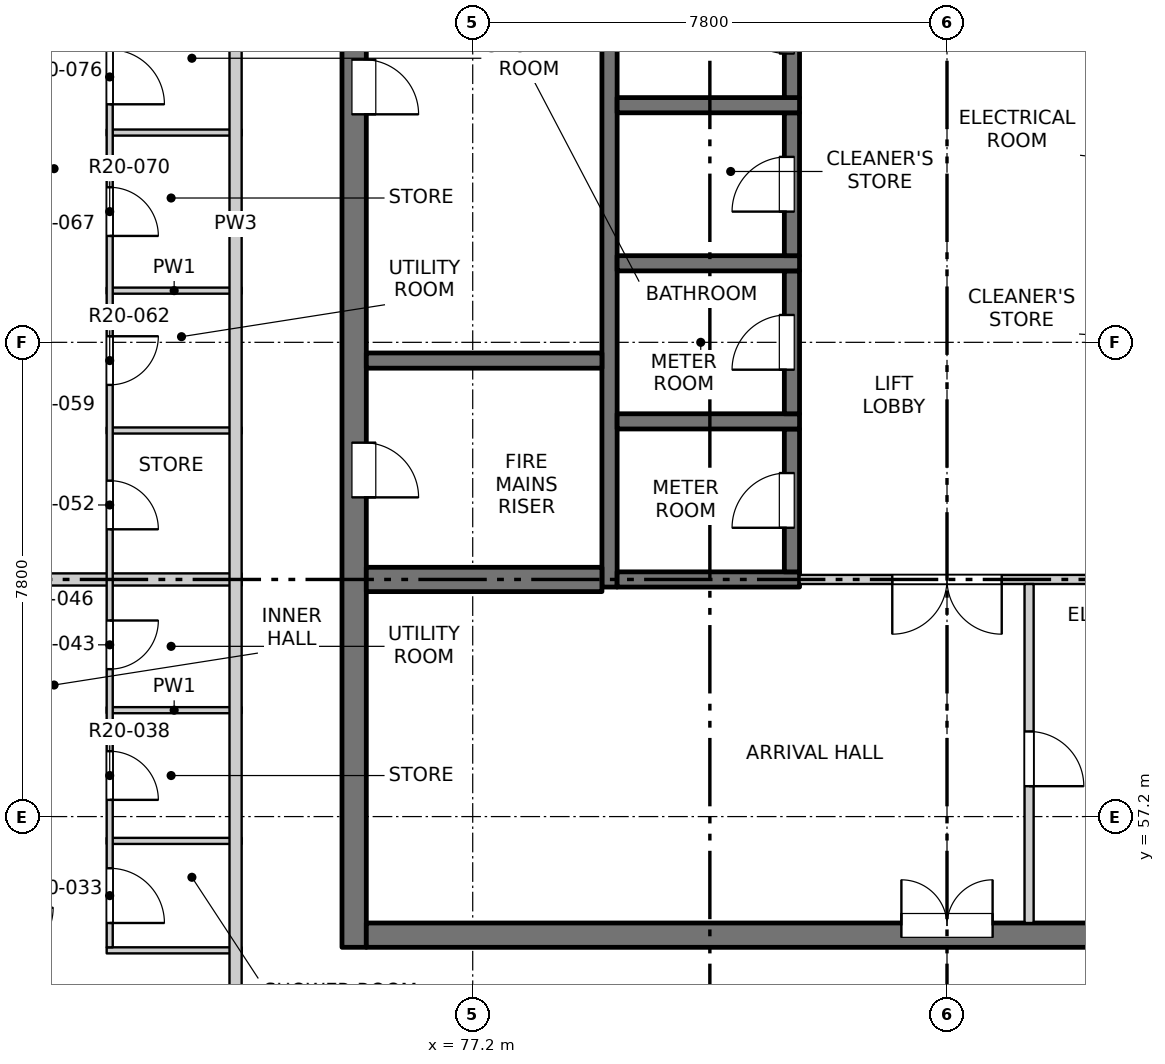
"""IFC4 building model, lengths in metres.
Left out: names, types, materials, properties, quantities, classifications, styles, units other than length and angle.
Written with IfcOpenShell. Run it as: python <this file> out.ifc"""

import sys

from ifc_helpers import new_model, si_unit, direction, frame, frame_2d, origin, place, context, subcontext, project, spatial, rectangle, extrude, element, fill, save


model = new_model("IFC4")
c1 = context("Model", 3, precision=1e-05, world=origin(), true_north=direction((0.0, 1.0)))
c2 = subcontext(c1, "Body", "Model", "MODEL_VIEW")
j1 = project(units=[si_unit("LENGTHUNIT", "METRE"), si_unit("PLANEANGLEUNIT", "RADIAN")], contexts=[c1])
p1 = place(None, origin())
s1 = spatial("IfcSite", under=j1, at=p1, CompositionType="ELEMENT")
p2 = place(p1, origin())
s2 = spatial("IfcBuilding", under=s1, at=p2, CompositionType="ELEMENT")
p3 = place(p2, frame((0.0, 0.0, 210.9)))
s3 = spatial("IfcBuildingStorey", under=s2, at=p3, CompositionType="ELEMENT", Elevation=210.9)
p4 = place(p3, frame((75.25, 55.05, -0.25), z_axis=(0.0, 0.0, 1.0), x_axis=(0.0, 1.0, 0.0)))
e1 = element("IfcWall", 1, at=p4, inside=s3, PredefinedType="SOLIDWALL", context=c2, shape_type="SweptSolid", body=[
    extrude(rectangle(XDim=22.25, YDim=0.4, at=frame_2d((11.125, 0.0))), origin(), (0.0, 0.0, 1.0), 3.4),
])
p5 = place(p4, frame((7.4, 0.0, 0.25)))
e2 = element("IfcOpeningElement", 2, at=p5, cuts=e1, PredefinedType="OPENING", context=c2, shape_type="SweptSolid", body=[
    extrude(rectangle(XDim=0.9, YDim=2.1, at=frame_2d((0.45, 1.05))), frame((0.0, 0.21, 0.0), z_axis=(0.0, -1.0, 0.0), x_axis=(1.0, 0.0, 0.0)), (0.0, 0.0, 1.0), 0.42),
])
p6 = place(p4, frame((13.7, 0.0, 0.25)))
e3 = element("IfcOpeningElement", 3, at=p6, cuts=e1, PredefinedType="OPENING", context=c2, shape_type="SweptSolid", body=[
    extrude(rectangle(XDim=0.9, YDim=2.1, at=frame_2d((0.45, 1.05))), frame((0.0, 0.21, 0.0), z_axis=(0.0, -1.0, 0.0), x_axis=(1.0, 0.0, 0.0)), (0.0, 0.0, 1.0), 0.42),
])
p7 = place(p4, frame((20.0, 0.0, 0.25)))
e4 = element("IfcOpeningElement", 4, at=p7, cuts=e1, PredefinedType="OPENING", context=c2, shape_type="SweptSolid", body=[
    extrude(rectangle(XDim=0.9, YDim=2.1, at=frame_2d((0.45, 1.05))), frame((0.0, 0.21, 0.0), z_axis=(0.0, -1.0, 0.0), x_axis=(1.0, 0.0, 0.0)), (0.0, 0.0, 1.0), 0.42),
])
p8 = place(p3, frame((75.45, 55.25, -0.25), z_axis=(0.0, 0.0, 1.0), x_axis=(1.0, 0.0, 0.0)))
e5 = element("IfcWall", 5, at=p8, inside=s3, PredefinedType="SOLIDWALL", context=c2, shape_type="SweptSolid", body=[
    extrude(rectangle(XDim=19.1, YDim=0.4, at=frame_2d((9.55, 0.0))), origin(), (0.0, 0.0, 1.0), 3.4),
])
p9 = place(p8, frame((8.8, 0.0, 0.25)))
e6 = element("IfcOpeningElement", 6, at=p9, cuts=e5, PredefinedType="OPENING", context=c2, shape_type="SweptSolid", body=[
    extrude(rectangle(XDim=1.5, YDim=2.1, at=frame_2d((0.75, 1.05))), frame((0.0, 0.21, 0.0), z_axis=(0.0, -1.0, 0.0), x_axis=(1.0, 0.0, 0.0)), (0.0, 0.0, 1.0), 0.42),
])
p10 = place(p3, frame((79.45, 60.975, -0.25), z_axis=(0.0, 0.0, 1.0), x_axis=(0.0, 1.0, 0.0)))
e7 = element("IfcWall", 7, at=p10, inside=s3, PredefinedType="SOLIDWALL", context=c2, shape_type="SweptSolid", body=[
    extrude(rectangle(XDim=16.325, YDim=0.25, at=frame_2d((8.163, 0.0))), origin(), (0.0, 0.0, 1.0), 3.4),
])
p11 = place(p3, frame((79.575, 61.1, -0.25), z_axis=(0.0, 0.0, 1.0), x_axis=(1.0, 0.0, 0.0)))
e8 = element("IfcWall", 8, at=p11, inside=s3, PredefinedType="SOLIDWALL", context=c2, shape_type="SweptSolid", body=[
    extrude(rectangle(XDim=3.0, YDim=0.25, at=frame_2d((1.5, 0.0))), origin(), (0.0, 0.0, 1.0), 3.4),
])
p12 = place(p3, frame((82.45, 61.225, -0.25), z_axis=(0.0, 0.0, 1.0), x_axis=(0.0, 1.0, 0.0)))
e9 = element("IfcWall", 9, at=p12, inside=s3, PredefinedType="SOLIDWALL", context=c2, shape_type="SweptSolid", body=[
    extrude(rectangle(XDim=2.35, YDim=0.25, at=frame_2d((1.175, 0.0))), origin(), (0.0, 0.0, 1.0), 3.4),
])
p13 = place(p12, frame((0.725, 0.0, 0.25)))
e10 = element("IfcOpeningElement", 10, at=p13, cuts=e9, PredefinedType="OPENING", context=c2, shape_type="SweptSolid", body=[
    extrude(rectangle(XDim=0.9, YDim=2.1, at=frame_2d((0.45, 1.05))), frame((0.0, 0.135, 0.0), z_axis=(0.0, -1.0, 0.0), x_axis=(1.0, 0.0, 0.0)), (0.0, 0.0, 1.0), 0.27),
])
p14 = place(p3, frame((79.575, 63.7, -0.25), z_axis=(0.0, 0.0, 1.0), x_axis=(1.0, 0.0, 0.0)))
e11 = element("IfcWall", 11, at=p14, inside=s3, PredefinedType="SOLIDWALL", context=c2, shape_type="SweptSolid", body=[
    extrude(rectangle(XDim=3.0, YDim=0.25, at=frame_2d((1.5, 0.0))), origin(), (0.0, 0.0, 1.0), 3.4),
])
p15 = place(p3, frame((82.45, 63.825, -0.25), z_axis=(0.0, 0.0, 1.0), x_axis=(0.0, 1.0, 0.0)))
e12 = element("IfcWall", 12, at=p15, inside=s3, PredefinedType="SOLIDWALL", context=c2, shape_type="SweptSolid", body=[
    extrude(rectangle(XDim=2.35, YDim=0.25, at=frame_2d((1.175, 0.0))), origin(), (0.0, 0.0, 1.0), 3.4),
])
p16 = place(p15, frame((0.725, 0.0, 0.25)))
e13 = element("IfcOpeningElement", 13, at=p16, cuts=e12, PredefinedType="OPENING", context=c2, shape_type="SweptSolid", body=[
    extrude(rectangle(XDim=0.9, YDim=2.1, at=frame_2d((0.45, 1.05))), frame((0.0, 0.135, 0.0), z_axis=(0.0, -1.0, 0.0), x_axis=(1.0, 0.0, 0.0)), (0.0, 0.0, 1.0), 0.27),
])
p17 = place(p3, frame((79.575, 66.3, -0.25), z_axis=(0.0, 0.0, 1.0), x_axis=(1.0, 0.0, 0.0)))
e14 = element("IfcWall", 14, at=p17, inside=s3, PredefinedType="SOLIDWALL", context=c2, shape_type="SweptSolid", body=[
    extrude(rectangle(XDim=3.0, YDim=0.25, at=frame_2d((1.5, 0.0))), origin(), (0.0, 0.0, 1.0), 3.4),
])
p18 = place(p3, frame((82.45, 66.425, -0.25), z_axis=(0.0, 0.0, 1.0), x_axis=(0.0, 1.0, 0.0)))
e15 = element("IfcWall", 15, at=p18, inside=s3, PredefinedType="SOLIDWALL", context=c2, shape_type="SweptSolid", body=[
    extrude(rectangle(XDim=2.35, YDim=0.25, at=frame_2d((1.175, 0.0))), origin(), (0.0, 0.0, 1.0), 3.4),
])
p19 = place(p18, frame((0.725, 0.0, 0.25)))
e16 = element("IfcOpeningElement", 16, at=p19, cuts=e15, PredefinedType="OPENING", context=c2, shape_type="SweptSolid", body=[
    extrude(rectangle(XDim=0.9, YDim=2.1, at=frame_2d((0.45, 1.05))), frame((0.0, 0.135, 0.0), z_axis=(0.0, -1.0, 0.0), x_axis=(1.0, 0.0, 0.0)), (0.0, 0.0, 1.0), 0.27),
])
p20 = place(p3, frame((79.575, 68.9, -0.25), z_axis=(0.0, 0.0, 1.0), x_axis=(1.0, 0.0, 0.0)))
e17 = element("IfcWall", 17, at=p20, inside=s3, PredefinedType="SOLIDWALL", context=c2, shape_type="SweptSolid", body=[
    extrude(rectangle(XDim=3.0, YDim=0.25, at=frame_2d((1.5, 0.0))), origin(), (0.0, 0.0, 1.0), 3.4),
])
p21 = place(p3, frame((82.45, 69.025, -0.25), z_axis=(0.0, 0.0, 1.0), x_axis=(0.0, 1.0, 0.0)))
e18 = element("IfcWall", 18, at=p21, inside=s3, PredefinedType="SOLIDWALL", context=c2, shape_type="SweptSolid", body=[
    extrude(rectangle(XDim=2.35, YDim=0.25, at=frame_2d((1.175, 0.0))), origin(), (0.0, 0.0, 1.0), 3.4),
])
p22 = place(p21, frame((0.725, 0.0, 0.25)))
e19 = element("IfcOpeningElement", 19, at=p22, cuts=e18, PredefinedType="OPENING", context=c2, shape_type="SweptSolid", body=[
    extrude(rectangle(XDim=0.9, YDim=2.1, at=frame_2d((0.45, 1.05))), frame((0.0, 0.135, 0.0), z_axis=(0.0, -1.0, 0.0), x_axis=(1.0, 0.0, 0.0)), (0.0, 0.0, 1.0), 0.27),
])
p23 = place(p3, frame((75.45, 61.1, -0.25), z_axis=(0.0, 0.0, 1.0), x_axis=(1.0, 0.0, 0.0)))
e20 = element("IfcWall", 20, at=p23, inside=s3, PredefinedType="SOLIDWALL", context=c2, shape_type="SweptSolid", body=[
    extrude(rectangle(XDim=3.875, YDim=0.4, at=frame_2d((1.938, 0.0))), origin(), (0.0, 0.0, 1.0), 3.4),
])
p24 = place(p3, frame((75.45, 64.7, -0.25), z_axis=(0.0, 0.0, 1.0), x_axis=(1.0, 0.0, 0.0)))
e21 = element("IfcWall", 21, at=p24, inside=s3, PredefinedType="SOLIDWALL", context=c2, shape_type="SweptSolid", body=[
    extrude(rectangle(XDim=3.875, YDim=0.25, at=frame_2d((1.938, 0.0))), origin(), (0.0, 0.0, 1.0), 3.4),
])
for number, where, z_axis, x_axis in (
    (22, (71.18, 55.0, 0.0), (0.0, 0.0, 1.0), (1.0, 0.0, 0.0)),
    (23, (71.18, 56.8, 0.0), (0.0, 0.0, 1.0), (1.0, 0.0, 0.0)),
    (24, (71.18, 58.95, 0.0), (0.0, 0.0, 1.0), (1.0, 0.0, 0.0)),
):
    element("IfcWall", number, at=place(p3, frame(where, z_axis=z_axis, x_axis=x_axis)), inside=s3, PredefinedType="PARTITIONING", context=c2, shape_type="SweptSolid", body=[
        extrude(rectangle(XDim=2.22, YDim=0.1, at=frame_2d((1.11, 0.0))), origin(), (0.0, 0.0, 1.0), 3.15),
    ])
p25 = place(p3, frame((61.9, 61.1, 0.0), z_axis=(0.0, 0.0, 1.0), x_axis=(1.0, 0.0, 0.0)))
e25 = element("IfcWall", 25, at=p25, inside=s3, PredefinedType="PARTITIONING", context=c2, shape_type="SweptSolid", body=[
    extrude(rectangle(XDim=11.5, YDim=0.2, at=frame_2d((5.75, 0.0))), origin(), (0.0, 0.0, 1.0), 2.55),
])
p26 = place(p3, frame((82.575, 61.1, 0.0), z_axis=(0.0, 0.0, 1.0), x_axis=(1.0, 0.0, 0.0)))
e26 = element("IfcWall", 26, at=p26, inside=s3, PredefinedType="PARTITIONING", context=c2, shape_type="SweptSolid", body=[
    extrude(rectangle(XDim=4.85, YDim=0.15, at=frame_2d((2.425, 0.0))), origin(), (0.0, 0.0, 1.0), 3.15),
])
p27 = place(p26, frame((1.525, 0.0, 0.0)))
e27 = element("IfcOpeningElement", 27, at=p27, cuts=e26, PredefinedType="OPENING", context=c2, shape_type="SweptSolid", body=[
    extrude(rectangle(XDim=1.8, YDim=2.1, at=frame_2d((0.9, 1.05))), frame((0.0, 0.085, 0.0), z_axis=(0.0, -1.0, 0.0), x_axis=(1.0, 0.0, 0.0)), (0.0, 0.0, 1.0), 0.17),
])
for number, where, z_axis, x_axis in (
    (28, (71.18, 63.55, 0.0), (0.0, 0.0, 1.0), (1.0, 0.0, 0.0)),
    (29, (71.18, 65.85, 0.0), (0.0, 0.0, 1.0), (1.0, 0.0, 0.0)),
    (30, (71.18, 68.45, 0.0), (0.0, 0.0, 1.0), (1.0, 0.0, 0.0)),
):
    element("IfcWall", number, at=place(p3, frame(where, z_axis=z_axis, x_axis=x_axis)), inside=s3, PredefinedType="PARTITIONING", context=c2, shape_type="SweptSolid", body=[
        extrude(rectangle(XDim=2.22, YDim=0.1, at=frame_2d((1.11, 0.0))), origin(), (0.0, 0.0, 1.0), 3.15),
    ])
p28 = place(p3, frame((71.23, 55.05, 0.0), z_axis=(0.0, 0.0, 1.0), x_axis=(0.0, 1.0, 0.0)))
e31 = element("IfcWall", 31, at=p28, inside=s3, PredefinedType="PARTITIONING", context=c2, shape_type="SweptSolid", body=[
    extrude(rectangle(XDim=18.25, YDim=0.1, at=frame_2d((9.125, 0.0))), origin(), (0.0, 0.0, 1.0), 3.15),
])
p29 = place(p28, frame((0.4, 0.0, 0.0)))
e32 = element("IfcOpeningElement", 32, at=p29, cuts=e31, PredefinedType="OPENING", context=c2, shape_type="SweptSolid", body=[
    extrude(rectangle(XDim=0.9, YDim=2.1, at=frame_2d((0.45, 1.05))), frame((0.0, 0.06, 0.0), z_axis=(0.0, -1.0, 0.0), x_axis=(1.0, 0.0, 0.0)), (0.0, 0.0, 1.0), 0.12),
])
p30 = place(p28, frame((2.425, 0.0, 0.0)))
e33 = element("IfcOpeningElement", 33, at=p30, cuts=e31, PredefinedType="OPENING", context=c2, shape_type="SweptSolid", body=[
    extrude(rectangle(XDim=0.8, YDim=2.1, at=frame_2d((0.4, 1.05))), frame((0.0, 0.06, 0.0), z_axis=(0.0, -1.0, 0.0), x_axis=(1.0, 0.0, 0.0)), (0.0, 0.0, 1.0), 0.12),
])
p31 = place(p28, frame((4.575, 0.0, 0.0)))
e34 = element("IfcOpeningElement", 34, at=p31, cuts=e31, PredefinedType="OPENING", context=c2, shape_type="SweptSolid", body=[
    extrude(rectangle(XDim=0.8, YDim=2.1, at=frame_2d((0.4, 1.05))), frame((0.0, 0.06, 0.0), z_axis=(0.0, -1.0, 0.0), x_axis=(1.0, 0.0, 0.0)), (0.0, 0.0, 1.0), 0.12),
])
p32 = place(p28, frame((6.875, 0.0, 0.0)))
e35 = element("IfcOpeningElement", 35, at=p32, cuts=e31, PredefinedType="OPENING", context=c2, shape_type="SweptSolid", body=[
    extrude(rectangle(XDim=0.8, YDim=2.1, at=frame_2d((0.4, 1.05))), frame((0.0, 0.06, 0.0), z_axis=(0.0, -1.0, 0.0), x_axis=(1.0, 0.0, 0.0)), (0.0, 0.0, 1.0), 0.12),
])
p33 = place(p28, frame((9.25, 0.0, 0.0)))
e36 = element("IfcOpeningElement", 36, at=p33, cuts=e31, PredefinedType="OPENING", context=c2, shape_type="SweptSolid", body=[
    extrude(rectangle(XDim=0.8, YDim=2.1, at=frame_2d((0.4, 1.05))), frame((0.0, 0.06, 0.0), z_axis=(0.0, -1.0, 0.0), x_axis=(1.0, 0.0, 0.0)), (0.0, 0.0, 1.0), 0.12),
])
p34 = place(p28, frame((11.7, 0.0, 0.0)))
e37 = element("IfcOpeningElement", 37, at=p34, cuts=e31, PredefinedType="OPENING", context=c2, shape_type="SweptSolid", body=[
    extrude(rectangle(XDim=0.8, YDim=2.1, at=frame_2d((0.4, 1.05))), frame((0.0, 0.06, 0.0), z_axis=(0.0, -1.0, 0.0), x_axis=(1.0, 0.0, 0.0)), (0.0, 0.0, 1.0), 0.12),
])
p35 = place(p28, frame((13.865, 0.0, 0.0)))
e38 = element("IfcOpeningElement", 38, at=p35, cuts=e31, PredefinedType="OPENING", context=c2, shape_type="SweptSolid", body=[
    extrude(rectangle(XDim=0.9, YDim=2.1, at=frame_2d((0.45, 1.05))), frame((0.0, 0.06, 0.0), z_axis=(0.0, -1.0, 0.0), x_axis=(1.0, 0.0, 0.0)), (0.0, 0.0, 1.0), 0.12),
])
p36 = place(p28, frame((16.315, 0.0, 0.0)))
e39 = element("IfcOpeningElement", 39, at=p36, cuts=e31, PredefinedType="OPENING", context=c2, shape_type="SweptSolid", body=[
    extrude(rectangle(XDim=0.9, YDim=2.1, at=frame_2d((0.45, 1.05))), frame((0.0, 0.06, 0.0), z_axis=(0.0, -1.0, 0.0), x_axis=(1.0, 0.0, 0.0)), (0.0, 0.0, 1.0), 0.12),
])
p37 = place(p3, frame((73.3, 49.5, 0.0), z_axis=(0.0, 0.0, 1.0), x_axis=(0.0, 1.0, 0.0)))
e40 = element("IfcWall", 40, at=p37, inside=s3, PredefinedType="PARTITIONING", context=c2, shape_type="SweptSolid", body=[
    extrude(rectangle(XDim=34.9, YDim=0.2, at=frame_2d((17.45, 0.0))), origin(), (0.0, 0.0, 1.0), 3.15),
])
p38 = place(p37, frame((3.225, 0.0, 0.0)))
e41 = element("IfcOpeningElement", 41, at=p38, cuts=e40, PredefinedType="OPENING", context=c2, shape_type="SweptSolid", body=[
    extrude(rectangle(XDim=1.0, YDim=2.1, at=frame_2d((0.5, 1.05))), frame((0.0, 0.11, 0.0), z_axis=(0.0, -1.0, 0.0), x_axis=(1.0, 0.0, 0.0)), (0.0, 0.0, 1.0), 0.22),
])
p39 = place(p37, frame((25.125, 0.0, 0.0)))
e42 = element("IfcOpeningElement", 42, at=p39, cuts=e40, PredefinedType="OPENING", context=c2, shape_type="SweptSolid", body=[
    extrude(rectangle(XDim=1.0, YDim=2.1, at=frame_2d((0.5, 1.05))), frame((0.0, 0.11, 0.0), z_axis=(0.0, -1.0, 0.0), x_axis=(1.0, 0.0, 0.0)), (0.0, 0.0, 1.0), 0.22),
])
p40 = place(p37, frame((31.475, 0.0, 0.0)))
e43 = element("IfcOpeningElement", 43, at=p40, cuts=e40, PredefinedType="OPENING", context=c2, shape_type="SweptSolid", body=[
    extrude(rectangle(XDim=1.0, YDim=2.1, at=frame_2d((0.5, 1.05))), frame((0.0, 0.11, 0.0), z_axis=(0.0, -1.0, 0.0), x_axis=(1.0, 0.0, 0.0)), (0.0, 0.0, 1.0), 0.22),
])
p41 = place(p3, frame((86.35, 55.45, 0.0), z_axis=(0.0, 0.0, 1.0), x_axis=(0.0, 1.0, 0.0)))
e44 = element("IfcWall", 44, at=p41, inside=s3, PredefinedType="PARTITIONING", context=c2, shape_type="SweptSolid", body=[
    extrude(rectangle(XDim=5.575, YDim=0.15, at=frame_2d((2.788, 0.0))), origin(), (0.0, 0.0, 1.0), 3.15),
])
p42 = place(p41, frame((2.25, 0.0, 0.0)))
e45 = element("IfcOpeningElement", 45, at=p42, cuts=e44, PredefinedType="OPENING", context=c2, shape_type="SweptSolid", body=[
    extrude(rectangle(XDim=0.9, YDim=2.1, at=frame_2d((0.45, 1.05))), frame((0.0, 0.085, 0.0), z_axis=(0.0, -1.0, 0.0), x_axis=(1.0, 0.0, 0.0)), (0.0, 0.0, 1.0), 0.17),
])
p43 = place(p9, origin())
e46 = element("IfcDoor", 46, at=p43, inside=s3, OperationType="DOUBLE_DOOR_SINGLE_SWING", PredefinedType="DOOR", context=c2, shape_type="SweptSolid", body=[
    extrude(rectangle(XDim=1.5, YDim=2.1, at=frame_2d((0.75, 1.05))), frame((0.0, 0.185, 0.0), z_axis=(0.0, -1.0, 0.0), x_axis=(1.0, 0.0, 0.0)), (0.0, 0.0, 1.0), 0.05),
])
fill(e6, e46)
p44 = place(p29, origin())
e47 = element("IfcDoor", 47, at=p44, inside=s3, OperationType="SINGLE_SWING_RIGHT", PredefinedType="DOOR", context=c2, shape_type="SweptSolid", body=[
    extrude(rectangle(XDim=0.9, YDim=2.1, at=frame_2d((0.45, 1.05))), frame((0.0, 0.025, 0.0), z_axis=(0.0, -1.0, 0.0), x_axis=(1.0, 0.0, 0.0)), (0.0, 0.0, 1.0), 0.05),
])
fill(e32, e47)
p45 = place(p30, origin())
e48 = element("IfcDoor", 48, at=p45, inside=s3, OperationType="SINGLE_SWING_RIGHT", PredefinedType="DOOR", context=c2, shape_type="SweptSolid", body=[
    extrude(rectangle(XDim=0.8, YDim=2.1, at=frame_2d((0.4, 1.05))), frame((0.0, 0.025, 0.0), z_axis=(0.0, -1.0, 0.0), x_axis=(1.0, 0.0, 0.0)), (0.0, 0.0, 1.0), 0.05),
])
fill(e33, e48)
p46 = place(p42, origin())
e49 = element("IfcDoor", 49, at=p46, inside=s3, OperationType="SINGLE_SWING_RIGHT", PredefinedType="DOOR", context=c2, shape_type="SweptSolid", body=[
    extrude(rectangle(XDim=0.9, YDim=2.1, at=frame_2d((0.45, 1.05))), frame((0.0, 0.025, 0.0), z_axis=(0.0, -1.0, 0.0), x_axis=(1.0, 0.0, 0.0)), (0.0, 0.0, 1.0), 0.05),
])
fill(e45, e49)
p47 = place(p31, origin())
e50 = element("IfcDoor", 50, at=p47, inside=s3, OperationType="SINGLE_SWING_LEFT", PredefinedType="DOOR", context=c2, shape_type="SweptSolid", body=[
    extrude(rectangle(XDim=0.8, YDim=2.1, at=frame_2d((0.4, 1.05))), frame((0.0, 0.025, 0.0), z_axis=(0.0, -1.0, 0.0), x_axis=(1.0, 0.0, 0.0)), (0.0, 0.0, 1.0), 0.05),
])
fill(e34, e50)
p48 = place(p27, origin())
e51 = element("IfcDoor", 51, at=p48, inside=s3, OperationType="DOUBLE_DOOR_SINGLE_SWING", PredefinedType="DOOR", context=c2, shape_type="SweptSolid", body=[
    extrude(rectangle(XDim=1.8, YDim=2.1, at=frame_2d((0.9, 1.05))), frame((0.0, 0.025, 0.0), z_axis=(0.0, -1.0, 0.0), x_axis=(1.0, 0.0, 0.0)), (0.0, 0.0, 1.0), 0.05),
])
fill(e27, e51)
p49 = place(p32, origin())
e52 = element("IfcDoor", 52, at=p49, inside=s3, OperationType="SINGLE_SWING_RIGHT", PredefinedType="DOOR", context=c2, shape_type="SweptSolid", body=[
    extrude(rectangle(XDim=0.8, YDim=2.1, at=frame_2d((0.4, 1.05))), frame((0.0, 0.025, 0.0), z_axis=(0.0, -1.0, 0.0), x_axis=(1.0, 0.0, 0.0)), (0.0, 0.0, 1.0), 0.05),
])
fill(e35, e52)
p50 = place(p13, origin())
e53 = element("IfcDoor", 53, at=p50, inside=s3, OperationType="SINGLE_SWING_LEFT", PredefinedType="DOOR", context=c2, shape_type="SweptSolid", body=[
    extrude(rectangle(XDim=0.9, YDim=2.1, at=frame_2d((0.45, 1.05))), frame((0.0, 0.11, 0.0), z_axis=(0.0, -1.0, 0.0), x_axis=(1.0, 0.0, 0.0)), (0.0, 0.0, 1.0), 0.05),
])
fill(e10, e53)
p51 = place(p5, origin())
e54 = element("IfcDoor", 54, at=p51, inside=s3, OperationType="SINGLE_SWING_RIGHT", PredefinedType="DOOR", context=c2, shape_type="SweptSolid", body=[
    extrude(rectangle(XDim=0.9, YDim=2.1, at=frame_2d((0.45, 1.05))), frame((0.0, -0.135, 0.0), z_axis=(0.0, -1.0, 0.0), x_axis=(1.0, 0.0, 0.0)), (0.0, 0.0, 1.0), 0.05),
])
fill(e2, e54)
p52 = place(p33, origin())
e55 = element("IfcDoor", 55, at=p52, inside=s3, OperationType="SINGLE_SWING_LEFT", PredefinedType="DOOR", context=c2, shape_type="SweptSolid", body=[
    extrude(rectangle(XDim=0.8, YDim=2.1, at=frame_2d((0.4, 1.05))), frame((0.0, 0.025, 0.0), z_axis=(0.0, -1.0, 0.0), x_axis=(1.0, 0.0, 0.0)), (0.0, 0.0, 1.0), 0.05),
])
fill(e36, e55)
p53 = place(p16, origin())
e56 = element("IfcDoor", 56, at=p53, inside=s3, OperationType="SINGLE_SWING_LEFT", PredefinedType="DOOR", context=c2, shape_type="SweptSolid", body=[
    extrude(rectangle(XDim=0.9, YDim=2.1, at=frame_2d((0.45, 1.05))), frame((0.0, 0.11, 0.0), z_axis=(0.0, -1.0, 0.0), x_axis=(1.0, 0.0, 0.0)), (0.0, 0.0, 1.0), 0.05),
])
fill(e13, e56)
p54 = place(p34, origin())
e57 = element("IfcDoor", 57, at=p54, inside=s3, OperationType="SINGLE_SWING_RIGHT", PredefinedType="DOOR", context=c2, shape_type="SweptSolid", body=[
    extrude(rectangle(XDim=0.8, YDim=2.1, at=frame_2d((0.4, 1.05))), frame((0.0, 0.025, 0.0), z_axis=(0.0, -1.0, 0.0), x_axis=(1.0, 0.0, 0.0)), (0.0, 0.0, 1.0), 0.05),
])
fill(e37, e57)
p55 = place(p19, origin())
e58 = element("IfcDoor", 58, at=p55, inside=s3, OperationType="SINGLE_SWING_LEFT", PredefinedType="DOOR", context=c2, shape_type="SweptSolid", body=[
    extrude(rectangle(XDim=0.9, YDim=2.1, at=frame_2d((0.45, 1.05))), frame((0.0, 0.11, 0.0), z_axis=(0.0, -1.0, 0.0), x_axis=(1.0, 0.0, 0.0)), (0.0, 0.0, 1.0), 0.05),
])
fill(e16, e58)
p56 = place(p6, origin())
e59 = element("IfcDoor", 59, at=p56, inside=s3, OperationType="SINGLE_SWING_RIGHT", PredefinedType="DOOR", context=c2, shape_type="SweptSolid", body=[
    extrude(rectangle(XDim=0.9, YDim=2.1, at=frame_2d((0.45, 1.05))), frame((0.0, -0.135, 0.0), z_axis=(0.0, -1.0, 0.0), x_axis=(1.0, 0.0, 0.0)), (0.0, 0.0, 1.0), 0.05),
])
fill(e3, e59)
p57 = place(p35, origin())
e60 = element("IfcDoor", 60, at=p57, inside=s3, OperationType="SINGLE_SWING_RIGHT", PredefinedType="DOOR", context=c2, shape_type="SweptSolid", body=[
    extrude(rectangle(XDim=0.9, YDim=2.1, at=frame_2d((0.45, 1.05))), frame((0.0, 0.025, 0.0), z_axis=(0.0, -1.0, 0.0), x_axis=(1.0, 0.0, 0.0)), (0.0, 0.0, 1.0), 0.05),
])
fill(e38, e60)
p58 = place(p22, origin())
e61 = element("IfcDoor", 61, at=p58, inside=s3, OperationType="SINGLE_SWING_RIGHT", PredefinedType="DOOR", context=c2, shape_type="SweptSolid", body=[
    extrude(rectangle(XDim=0.9, YDim=2.1, at=frame_2d((0.45, 1.05))), frame((0.0, 0.11, 0.0), z_axis=(0.0, -1.0, 0.0), x_axis=(1.0, 0.0, 0.0)), (0.0, 0.0, 1.0), 0.05),
])
fill(e19, e61)
save(model, sys.argv[1])
